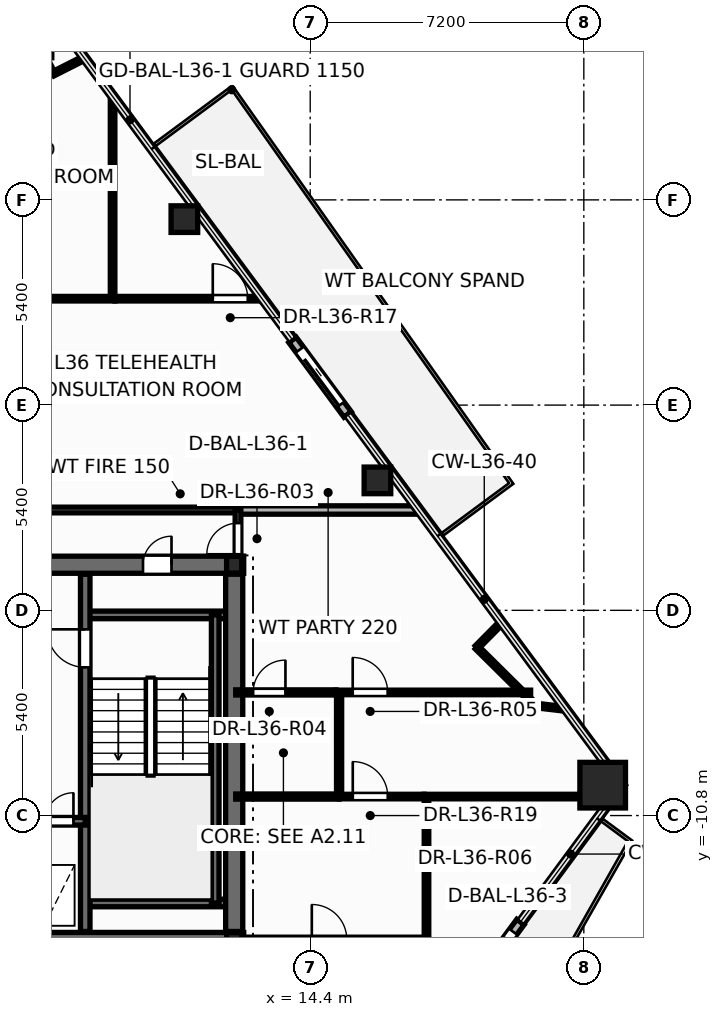
"""IFC4 building model, lengths in metres.
Left out: names, types, materials, properties, quantities, classifications, styles, units other than length and angle.
Written with IfcOpenShell. Run it as: python <this file> out.ifc"""

import sys

from ifc_helpers import new_model, si_unit, direction, frame, frame_2d, origin, origin_2d, place, context, subcontext, project, spatial, rectangle, hollow_rectangle, hollow_circle, i_section, extrude, element, fill, save


model = new_model("IFC4")
c1 = context("Model", 3, precision=1e-05, world=origin(), true_north=direction((0.0, 1.0)))
c2 = subcontext(c1, "Body", "Model", "MODEL_VIEW")
j1 = project(units=[si_unit("LENGTHUNIT", "METRE"), si_unit("PLANEANGLEUNIT", "RADIAN")], contexts=[c1])
p1 = place(None, origin())
s1 = spatial("IfcSite", under=j1, at=p1, CompositionType="ELEMENT")
p2 = place(p1, origin())
s2 = spatial("IfcBuilding", under=s1, at=p2, CompositionType="ELEMENT")
p3 = place(p2, frame((0.0, 0.0, 140.1)))
s3 = spatial("IfcBuildingStorey", under=s2, at=p3, CompositionType="ELEMENT", Elevation=140.1)
p4 = place(p3, frame((22.096, -10.0, 0.0), z_axis=(0.0, 0.0, 1.0), x_axis=(1.0, 0.0, 0.0)))
e1 = element("IfcColumn", 1, at=p4, inside=s3, PredefinedType="COLUMN", context=c2, shape_type="SweptSolid", body=[
    extrude(hollow_rectangle(XDim=1.2, YDim=1.2, WallThickness=0.055, at=origin_2d()), origin(), (0.0, 0.0, 1.0), 3.6),
])
for number, where, z_axis, x_axis in (
    (2, (16.169, -1.98, 0.0), (0.0, 0.0, 1.0), (1.0, 0.0, 0.0)),
    (3, (11.089, 4.894, 0.0), (0.0, 0.0, 1.0), (1.0, 0.0, 0.0)),
):
    element("IfcColumn", number, at=place(p3, frame(where, z_axis=z_axis, x_axis=x_axis)), inside=s3, PredefinedType="COLUMN", context=c2, shape_type="SweptSolid", body=[
        extrude(hollow_circle(Radius=0.35, WallThickness=0.03, at=origin_2d()), origin(), (0.0, 0.0, 1.0), 3.6),
    ])
for number, where, z_axis, x_axis in (
    (4, (12.4, -14.1, 0.0), (0.0, 0.0, 1.0), (1.0, 0.0, 0.0)),
    (5, (12.4, -4.2, 0.0), (0.0, 0.0, 1.0), (1.0, 0.0, 0.0)),
):
    element("IfcColumn", number, at=place(p3, frame(where, z_axis=z_axis, x_axis=x_axis)), inside=s3, PredefinedType="COLUMN", context=c2, shape_type="SweptSolid", body=[
        extrude(i_section(OverallWidth=0.4, OverallDepth=0.44, WebThickness=0.028, FlangeThickness=0.04, at=origin_2d()), origin(), (0.0, 0.0, 1.0), 3.6),
    ])
p5 = place(p3, frame((15.384, -0.246, -0.015), z_axis=(0.0, 0.0, 1.0), x_axis=(-0.594317914364, 0.804230201289, 0.0)))
e6 = element("IfcWall", 6, at=p5, inside=s3, PredefinedType="STANDARD", context=c2, shape_type="SweptSolid", body=[
    extrude(rectangle(XDim=2.44, YDim=0.24, at=frame_2d((1.22, 0.0))), origin(), (0.0, 0.0, 1.0), 2.807),
])
p6 = place(p5, frame((0.32, 0.0, 0.015)))
e7 = element("IfcOpeningElement", 7, at=p6, cuts=e6, PredefinedType="OPENING", context=c2, shape_type="SweptSolid", body=[
    extrude(rectangle(XDim=1.806, YDim=2.204, at=frame_2d((0.9, 1.102))), frame((0.0, 0.13, 0.0), z_axis=(0.0, -1.0, 0.0), x_axis=(1.0, 0.0, 0.0)), (0.0, 0.0, 1.0), 0.26),
])
p7 = place(p3, frame((18.66, -15.323, -0.015), z_axis=(0.0, 0.0, 1.0), x_axis=(0.594381437757, 0.804183254271, 0.0)))
e8 = element("IfcWall", 8, at=p7, inside=s3, PredefinedType="STANDARD", context=c2, shape_type="SweptSolid", body=[
    extrude(rectangle(XDim=2.14, YDim=0.24, at=frame_2d((1.07, 0.0))), origin(), (0.0, 0.0, 1.0), 2.807),
])
p8 = place(p7, frame((0.32, 0.0, 0.015)))
e9 = element("IfcOpeningElement", 9, at=p8, cuts=e8, PredefinedType="OPENING", context=c2, shape_type="SweptSolid", body=[
    extrude(rectangle(XDim=1.506, YDim=2.204, at=frame_2d((0.75, 1.102))), frame((0.0, 0.13, 0.0), z_axis=(0.0, -1.0, 0.0), x_axis=(1.0, 0.0, 0.0)), (0.0, 0.0, 1.0), 0.26),
])
p9 = place(p3, frame((-12.65, -14.1, 0.0), z_axis=(0.0, 0.0, 1.0), x_axis=(1.0, 0.0, 0.0)))
e10 = element("IfcWall", 10, at=p9, inside=s3, PredefinedType="SHEAR", context=c2, shape_type="SweptSolid", body=[
    extrude(rectangle(XDim=25.3, YDim=0.45, at=frame_2d((12.65, 0.0))), origin(), (0.0, 0.0, 1.0), 3.6),
])
p10 = place(p3, frame((-12.65, -4.2, 0.0), z_axis=(0.0, 0.0, 1.0), x_axis=(1.0, 0.0, 0.0)))
e11 = element("IfcWall", 11, at=p10, inside=s3, PredefinedType="SHEAR", context=c2, shape_type="SweptSolid", body=[
    extrude(rectangle(XDim=25.3, YDim=0.45, at=frame_2d((12.65, 0.0))), origin(), (0.0, 0.0, 1.0), 3.6),
])
p11 = place(p10, frame((1.85, 0.0, 0.0)))
e12 = element("IfcOpeningElement", 12, at=p11, cuts=e11, PredefinedType="OPENING", context=c2, shape_type="SweptSolid", body=[
    extrude(rectangle(XDim=0.756, YDim=2.054, at=frame_2d((0.375, 1.027))), frame((0.0, 0.235, 0.0), z_axis=(0.0, -1.0, 0.0), x_axis=(1.0, 0.0, 0.0)), (0.0, 0.0, 1.0), 0.47),
])
p12 = place(p10, frame((22.65, 0.0, 0.0)))
e13 = element("IfcOpeningElement", 13, at=p12, cuts=e11, PredefinedType="OPENING", context=c2, shape_type="SweptSolid", body=[
    extrude(rectangle(XDim=0.756, YDim=2.054, at=frame_2d((0.375, 1.027))), frame((0.0, 0.235, 0.0), z_axis=(0.0, -1.0, 0.0), x_axis=(1.0, 0.0, 0.0)), (0.0, 0.0, 1.0), 0.47),
])
p13 = place(p10, frame((5.85, 0.0, 0.0)))
e14 = element("IfcOpeningElement", 14, at=p13, cuts=e11, PredefinedType="OPENING", context=c2, shape_type="SweptSolid", body=[
    extrude(rectangle(XDim=1.006, YDim=2.104, at=frame_2d((0.5, 1.052))), frame((0.0, 0.235, 0.0), z_axis=(0.0, -1.0, 0.0), x_axis=(1.0, 0.0, 0.0)), (0.0, 0.0, 1.0), 0.47),
])
p14 = place(p10, frame((10.35, 0.0, 0.0)))
e15 = element("IfcOpeningElement", 15, at=p14, cuts=e11, PredefinedType="OPENING", context=c2, shape_type="SweptSolid", body=[
    extrude(rectangle(XDim=1.406, YDim=2.154, at=frame_2d((0.7, 1.077))), frame((0.0, 0.235, 0.0), z_axis=(0.0, -1.0, 0.0), x_axis=(1.0, 0.0, 0.0)), (0.0, 0.0, 1.0), 0.47),
])
p15 = place(p10, frame((18.45, 0.0, 0.0)))
e16 = element("IfcOpeningElement", 16, at=p15, cuts=e11, PredefinedType="OPENING", context=c2, shape_type="SweptSolid", body=[
    extrude(rectangle(XDim=1.006, YDim=2.104, at=frame_2d((0.5, 1.052))), frame((0.0, 0.235, 0.0), z_axis=(0.0, -1.0, 0.0), x_axis=(1.0, 0.0, 0.0)), (0.0, 0.0, 1.0), 0.47),
])
for number, where, z_axis, x_axis in (
    (17, (8.48, -5.52, 0.0), (0.0, 0.0, 1.0), (1.0, 0.0, 0.0)),
    (18, (8.48, -13.1, 0.0), (0.0, 0.0, 1.0), (1.0, 0.0, 0.0)),
):
    element("IfcWall", number, at=place(p3, frame(where, z_axis=z_axis, x_axis=x_axis)), inside=s3, PredefinedType="SOLIDWALL", context=c2, shape_type="SweptSolid", body=[
        extrude(rectangle(XDim=3.87, YDim=0.2, at=frame_2d((1.935, 0.0))), origin(), (0.0, 0.0, 1.0), 3.6),
    ])
p16 = place(p3, frame((11.9, -13.1, 0.0), z_axis=(0.0, 0.0, 1.0), x_axis=(0.0, 1.0, 0.0)))
e19 = element("IfcWall", 19, at=p16, inside=s3, PredefinedType="SOLIDWALL", context=c2, shape_type="SweptSolid", body=[
    extrude(rectangle(XDim=7.58, YDim=0.2, at=frame_2d((3.79, 0.0))), origin(), (0.0, 0.0, 1.0), 3.6),
])
p17 = place(p3, frame((8.48, -13.85, 0.0), z_axis=(0.0, 0.0, 1.0), x_axis=(0.0, 1.0, 0.0)))
e20 = element("IfcWall", 20, at=p17, inside=s3, PredefinedType="SHEAR", context=c2, shape_type="SweptSolid", body=[
    extrude(rectangle(XDim=9.4, YDim=0.25, at=frame_2d((4.7, 0.0))), origin(), (0.0, 0.0, 1.0), 3.6),
])
p18 = place(p17, frame((6.95, 0.0, 0.0)))
e21 = element("IfcOpeningElement", 21, at=p18, cuts=e20, PredefinedType="OPENING", context=c2, shape_type="SweptSolid", body=[
    extrude(rectangle(XDim=1.006, YDim=2.104, at=frame_2d((0.5, 1.052))), frame((0.0, 0.135, 0.0), z_axis=(0.0, -1.0, 0.0), x_axis=(1.0, 0.0, 0.0)), (0.0, 0.0, 1.0), 0.27),
])
p19 = place(p3, frame((5.12, -10.95, 0.0), z_axis=(0.0, 0.0, 1.0), x_axis=(1.0, 0.0, 0.0)))
e22 = element("IfcWall", 22, at=p19, inside=s3, PredefinedType="SOLIDWALL", context=c2, shape_type="SweptSolid", body=[
    extrude(rectangle(XDim=3.36, YDim=0.2, at=frame_2d((1.68, 0.0))), origin(), (0.0, 0.0, 1.0), 3.6),
])
p20 = place(p19, frame((0.42, 0.0, 0.0)))
e23 = element("IfcOpeningElement", 23, at=p20, cuts=e22, PredefinedType="OPENING", context=c2, shape_type="SweptSolid", body=[
    extrude(rectangle(XDim=1.106, YDim=2.104, at=frame_2d((0.55, 1.052))), frame((0.0, 0.11, 0.0), z_axis=(0.0, -1.0, 0.0), x_axis=(1.0, 0.0, 0.0)), (0.0, 0.0, 1.0), 0.22),
])
p21 = place(p19, frame((2.3, 0.0, 0.0)))
e24 = element("IfcOpeningElement", 24, at=p21, cuts=e22, PredefinedType="OPENING", context=c2, shape_type="SweptSolid", body=[
    extrude(rectangle(XDim=0.756, YDim=2.054, at=frame_2d((0.375, 1.027))), frame((0.0, 0.11, 0.0), z_axis=(0.0, -1.0, 0.0), x_axis=(1.0, 0.0, 0.0)), (0.0, 0.0, 1.0), 0.22),
])
p22 = place(p3, frame((12.4, -13.85, 0.0), z_axis=(0.0, 0.0, 1.0), x_axis=(0.0, 1.0, 0.0)))
e25 = element("IfcWall", 25, at=p22, inside=s3, PredefinedType="SHEAR", context=c2, shape_type="SweptSolid", body=[
    extrude(rectangle(XDim=9.4, YDim=0.45, at=frame_2d((4.7, 0.0))), origin(), (0.0, 0.0, 1.0), 3.6),
])
p23 = place(p3, frame((2.36, -2.76, 0.0), z_axis=(0.0, 0.0, 1.0), x_axis=(1.0, 0.0, 0.0)))
e26 = element("IfcWall", 26, at=p23, inside=s3, PredefinedType="PARTITIONING", context=c2, shape_type="SweptSolid", body=[
    extrude(rectangle(XDim=10.14, YDim=0.15, at=frame_2d((5.07, 0.0))), origin(), (0.0, 0.0, 1.0), 2.325),
])
p24 = place(p23, frame((0.36, 0.0, 0.0)))
e27 = element("IfcOpeningElement", 27, at=p24, cuts=e26, PredefinedType="OPENING", context=c2, shape_type="SweptSolid", body=[
    extrude(rectangle(XDim=0.956, YDim=2.104, at=frame_2d((0.475, 1.052))), frame((0.0, 0.085, 0.0), z_axis=(0.0, -1.0, 0.0), x_axis=(1.0, 0.0, 0.0)), (0.0, 0.0, 1.0), 0.17),
])
p25 = place(p3, frame((2.36, 2.8, 0.0), z_axis=(0.0, 0.0, 1.0), x_axis=(1.0, 0.0, 0.0)))
e28 = element("IfcWall", 28, at=p25, inside=s3, PredefinedType="PARTITIONING", context=c2, shape_type="SweptSolid", body=[
    extrude(rectangle(XDim=6.9, YDim=0.12, at=frame_2d((3.45, 0.0))), origin(), (0.0, 0.0, 1.0), 2.325),
])
p26 = place(p3, frame((9.2, 2.8, 0.0), z_axis=(0.0, 0.0, 1.0), x_axis=(0.0, 1.0, 0.0)))
e29 = element("IfcWall", 29, at=p26, inside=s3, PredefinedType="PARTITIONING", context=c2, shape_type="SweptSolid", body=[
    extrude(rectangle(XDim=5.322, YDim=0.12, at=frame_2d((2.661, 0.0))), origin(), (0.0, 0.0, 1.0), 2.325),
])
p27 = place(p3, frame((2.36, 9.2, 0.0), z_axis=(0.0, 0.0, 1.0), x_axis=(1.0, 0.0, 0.0)))
e30 = element("IfcWall", 30, at=p27, inside=s3, PredefinedType="PARTITIONING", context=c2, shape_type="SweptSolid", body=[
    extrude(rectangle(XDim=5.24, YDim=0.12, at=frame_2d((2.62, 0.0))), origin(), (0.0, 0.0, 1.0), 2.325),
])
p28 = place(p3, frame((15.08, -7.56, 0.0), z_axis=(0.0, 0.0, 1.0), x_axis=(1.0, 0.0, 0.0)))
e31 = element("IfcWall", 31, at=p28, inside=s3, PredefinedType="PARTITIONING", context=c2, shape_type="SweptSolid", body=[
    extrude(rectangle(XDim=5.12, YDim=0.12, at=frame_2d((2.56, 0.0))), origin(), (0.0, 0.0, 1.0), 2.325),
])
p29 = place(p28, frame((0.438, 0.0, 0.0)))
e32 = element("IfcOpeningElement", 32, at=p29, cuts=e31, PredefinedType="OPENING", context=c2, shape_type="SweptSolid", body=[
    extrude(rectangle(XDim=0.926, YDim=2.104, at=frame_2d((0.46, 1.052))), frame((0.0, 0.07, 0.0), z_axis=(0.0, -1.0, 0.0), x_axis=(1.0, 0.0, 0.0)), (0.0, 0.0, 1.0), 0.14),
])
p30 = place(p3, frame((17.4, -10.3, 0.0), z_axis=(0.0, 0.0, 1.0), x_axis=(1.0, 0.0, 0.0)))
e33 = element("IfcWall", 33, at=p30, inside=s3, PredefinedType="PARTITIONING", context=c2, shape_type="SweptSolid", body=[
    extrude(rectangle(XDim=4.972, YDim=0.12, at=frame_2d((2.486, 0.0))), origin(), (0.0, 0.0, 1.0), 2.792),
])
p31 = place(p3, frame((12.5, -2.76, 0.0), z_axis=(0.0, 0.0, 1.0), x_axis=(1.0, 0.0, 0.0)))
e34 = element("IfcWall", 34, at=p31, inside=s3, PredefinedType="PARTITIONING", context=c2, shape_type="SweptSolid", body=[
    extrude(rectangle(XDim=4.743, YDim=0.22, at=frame_2d((2.371, 0.0))), origin(), (0.0, 0.0, 1.0), 2.792),
])
p32 = place(p3, frame((9.262, 2.8, 0.0), z_axis=(0.0, 0.0, 1.0), x_axis=(1.0, 0.0, 0.0)))
e35 = element("IfcWall", 35, at=p32, inside=s3, PredefinedType="PARTITIONING", context=c2, shape_type="SweptSolid", body=[
    extrude(rectangle(XDim=3.872, YDim=0.12, at=frame_2d((1.936, 0.0))), origin(), (0.0, 0.0, 1.0), 2.792),
])
p33 = place(p32, frame((2.574, 0.0, 0.0)))
e36 = element("IfcOpeningElement", 36, at=p33, cuts=e35, PredefinedType="OPENING", context=c2, shape_type="SweptSolid", body=[
    extrude(rectangle(XDim=0.926, YDim=2.104, at=frame_2d((0.46, 1.052))), frame((0.0, 0.07, 0.0), z_axis=(0.0, -1.0, 0.0), x_axis=(1.0, 0.0, 0.0)), (0.0, 0.0, 1.0), 0.14),
])
p34 = place(p3, frame((17.46, -14.06, 0.0), z_axis=(0.0, 0.0, 1.0), x_axis=(0.0, 1.0, 0.0)))
e37 = element("IfcWall", 37, at=p34, inside=s3, PredefinedType="PARTITIONING", context=c2, shape_type="SweptSolid", body=[
    extrude(rectangle(XDim=3.76, YDim=0.12, at=frame_2d((1.88, 0.0))), origin(), (0.0, 0.0, 1.0), 3.35),
])
p35 = place(p3, frame((12.44, -7.56, 0.0), z_axis=(0.0, 0.0, 1.0), x_axis=(1.0, 0.0, 0.0)))
e38 = element("IfcWall", 38, at=p35, inside=s3, PredefinedType="PARTITIONING", context=c2, shape_type="SweptSolid", body=[
    extrude(rectangle(XDim=2.638, YDim=0.135, at=frame_2d((1.319, 0.0))), origin(), (0.0, 0.0, 1.0), 2.792),
])
p36 = place(p35, frame((0.458, 0.0, 0.0)))
e39 = element("IfcOpeningElement", 39, at=p36, cuts=e38, PredefinedType="OPENING", context=c2, shape_type="SweptSolid", body=[
    extrude(rectangle(XDim=0.856, YDim=2.104, at=frame_2d((0.425, 1.052))), frame((0.0, 0.078, 0.0), z_axis=(0.0, -1.0, 0.0), x_axis=(1.0, 0.0, 0.0)), (0.0, 0.0, 1.0), 0.155),
])
p37 = place(p3, frame((15.16, -10.3, 0.0), z_axis=(0.0, 0.0, 1.0), x_axis=(0.0, 1.0, 0.0)))
e40 = element("IfcWall", 40, at=p37, inside=s3, PredefinedType="PARTITIONING", context=c2, shape_type="SweptSolid", body=[
    extrude(rectangle(XDim=2.74, YDim=0.135, at=frame_2d((1.37, 0.0))), origin(), (0.0, 0.0, 1.0), 3.35),
])
p38 = place(p3, frame((12.44, -10.3, 0.0), z_axis=(0.0, 0.0, 1.0), x_axis=(1.0, 0.0, 0.0)))
e41 = element("IfcWall", 41, at=p38, inside=s3, PredefinedType="PARTITIONING", context=c2, shape_type="SweptSolid", body=[
    extrude(rectangle(XDim=2.72, YDim=0.135, at=frame_2d((1.36, 0.0))), origin(), (0.0, 0.0, 1.0), 2.792),
])
p39 = place(p3, frame((15.16, -10.3, 0.0), z_axis=(0.0, 0.0, 1.0), x_axis=(1.0, 0.0, 0.0)))
e42 = element("IfcWall", 42, at=p39, inside=s3, PredefinedType="PARTITIONING", context=c2, shape_type="SweptSolid", body=[
    extrude(rectangle(XDim=2.238, YDim=0.12, at=frame_2d((1.119, 0.0))), origin(), (0.0, 0.0, 1.0), 3.35),
])
p40 = place(p39, frame((0.36, 0.0, 0.0)))
e43 = element("IfcOpeningElement", 43, at=p40, cuts=e42, PredefinedType="OPENING", context=c2, shape_type="SweptSolid", body=[
    extrude(rectangle(XDim=0.926, YDim=2.104, at=frame_2d((0.46, 1.052))), frame((0.0, 0.07, 0.0), z_axis=(0.0, -1.0, 0.0), x_axis=(1.0, 0.0, 0.0)), (0.0, 0.0, 1.0), 0.14),
])
p41 = place(p3, frame((7.632, 8.716, 0.0), z_axis=(0.0, 0.0, 1.0), x_axis=(-0.451617656026, 0.892211573992, 0.0)))
e44 = element("IfcWall", 44, at=p41, inside=s3, PredefinedType="PARTITIONING", context=c2, shape_type="SweptSolid", body=[
    extrude(rectangle(XDim=2.06, YDim=0.12, at=frame_2d((1.03, 0.0))), origin(), (0.0, 0.0, 1.0), 3.35),
])
p42 = place(p3, frame((20.33, -7.903, 0.0), z_axis=(0.0, 0.0, 1.0), x_axis=(-0.71069096923, 0.70350433279, 0.0)))
e45 = element("IfcWall", 45, at=p42, inside=s3, PredefinedType="PARTITIONING", context=c2, shape_type="SweptSolid", body=[
    extrude(rectangle(XDim=2.174, YDim=0.12, at=frame_2d((1.087, 0.0))), origin(), (0.0, 0.0, 1.0), 3.35),
])
p43 = place(p3, frame((12.5, -4.24, 0.0), z_axis=(0.0, 0.0, 1.0), x_axis=(0.0, 1.0, 0.0)))
e46 = element("IfcWall", 46, at=p43, inside=s3, PredefinedType="PARTITIONING", context=c2, shape_type="SweptSolid", body=[
    extrude(rectangle(XDim=1.48, YDim=0.15, at=frame_2d((0.74, 0.0))), origin(), (0.0, 0.0, 1.0), 2.325),
])
p44 = place(p43, frame((0.315, 0.0, 0.0)))
e47 = element("IfcOpeningElement", 47, at=p44, cuts=e46, PredefinedType="OPENING", context=c2, shape_type="SweptSolid", body=[
    extrude(rectangle(XDim=0.826, YDim=2.104, at=frame_2d((0.41, 1.052))), frame((0.0, 0.085, 0.0), z_axis=(0.0, -1.0, 0.0), x_axis=(1.0, 0.0, 0.0)), (0.0, 0.0, 1.0), 0.17),
])
p45 = place(p3, frame((8.445, 9.127, 0.0), z_axis=(0.0, 0.0, 1.0), x_axis=(-0.892273316606, -0.451495657202, 0.0)))
e48 = element("IfcWall", 48, at=p45, inside=s3, PredefinedType="PARTITIONING", context=c2, shape_type="SweptSolid", body=[
    extrude(rectangle(XDim=0.911, YDim=0.12, at=frame_2d((0.456, 0.0))), origin(), (0.0, 0.0, 1.0), 2.792),
])
p46 = place(p3, frame((18.784, -6.374, 0.0), z_axis=(0.0, 0.0, 1.0), x_axis=(0.703469957503, 0.710724995262, 0.0)))
e49 = element("IfcWall", 49, at=p46, inside=s3, PredefinedType="PARTITIONING", context=c2, shape_type="SweptSolid", body=[
    extrude(rectangle(XDim=0.909, YDim=0.12, at=frame_2d((0.454, 0.0))), origin(), (0.0, 0.0, 1.0), 2.792),
])
p47 = place(p3, frame((21.098, -7.993, 0.0), z_axis=(0.0, 0.0, 1.0), x_axis=(-0.993159218392, 0.116768004705, 0.0)))
e50 = element("IfcWall", 50, at=p47, inside=s3, PredefinedType="PARTITIONING", context=c2, shape_type="SweptSolid", body=[
    extrude(rectangle(XDim=0.774, YDim=0.12, at=frame_2d((0.387, 0.0))), origin(), (0.0, 0.0, 1.0), 2.792),
])
p48 = place(p6, origin())
e51 = element("IfcDoor", 51, at=p48, inside=s3, OperationType="SLIDING_TO_LEFT", PredefinedType="DOOR", context=c2, shape_type="SweptSolid", body=[
    extrude(rectangle(XDim=1.8, YDim=2.2, at=frame_2d((0.9, 1.1))), frame((0.0, 0.025, 0.0), z_axis=(0.0, -1.0, 0.0), x_axis=(1.0, 0.0, 0.0)), (0.0, 0.0, 1.0), 0.05),
])
fill(e7, e51)
p49 = place(p8, origin())
e52 = element("IfcDoor", 52, at=p49, inside=s3, OperationType="SLIDING_TO_RIGHT", PredefinedType="DOOR", context=c2, shape_type="SweptSolid", body=[
    extrude(rectangle(XDim=1.5, YDim=2.2, at=frame_2d((0.75, 1.1))), frame((0.0, 0.025, 0.0), z_axis=(0.0, -1.0, 0.0), x_axis=(1.0, 0.0, 0.0)), (0.0, 0.0, 1.0), 0.05),
])
fill(e9, e52)
p50 = place(p18, origin())
e53 = element("IfcDoor", 53, at=p50, inside=s3, OperationType="SINGLE_SWING_RIGHT", PredefinedType="DOOR", context=c2, shape_type="SweptSolid", body=[
    extrude(rectangle(XDim=1.0, YDim=2.1, at=frame_2d((0.5, 1.05))), frame((0.0, 0.025, 0.0), z_axis=(0.0, -1.0, 0.0), x_axis=(1.0, 0.0, 0.0)), (0.0, 0.0, 1.0), 0.05),
])
fill(e21, e53)
p51 = place(p21, origin())
e54 = element("IfcDoor", 54, at=p51, inside=s3, OperationType="SINGLE_SWING_RIGHT", PredefinedType="DOOR", context=c2, shape_type="SweptSolid", body=[
    extrude(rectangle(XDim=0.75, YDim=2.05, at=frame_2d((0.375, 1.025))), frame((0.0, 0.025, 0.0), z_axis=(0.0, -1.0, 0.0), x_axis=(1.0, 0.0, 0.0)), (0.0, 0.0, 1.0), 0.05),
])
fill(e24, e54)
p52 = place(p12, origin())
e55 = element("IfcDoor", 55, at=p52, inside=s3, OperationType="SINGLE_SWING_RIGHT", PredefinedType="DOOR", context=c2, shape_type="SweptSolid", body=[
    extrude(rectangle(XDim=0.75, YDim=2.05, at=frame_2d((0.375, 1.025))), frame((0.0, 0.025, 0.0), z_axis=(0.0, -1.0, 0.0), x_axis=(1.0, 0.0, 0.0)), (0.0, 0.0, 1.0), 0.05),
])
fill(e13, e55)
p53 = place(p44, origin())
e56 = element("IfcDoor", 56, at=p53, inside=s3, OperationType="SINGLE_SWING_LEFT", PredefinedType="DOOR", context=c2, shape_type="SweptSolid", body=[
    extrude(rectangle(XDim=0.82, YDim=2.1, at=frame_2d((0.41, 1.05))), frame((0.0, 0.025, 0.0), z_axis=(0.0, -1.0, 0.0), x_axis=(1.0, 0.0, 0.0)), (0.0, 0.0, 1.0), 0.05),
])
fill(e47, e56)
p54 = place(p36, origin())
e57 = element("IfcDoor", 57, at=p54, inside=s3, OperationType="SINGLE_SWING_RIGHT", PredefinedType="DOOR", context=c2, shape_type="SweptSolid", body=[
    extrude(rectangle(XDim=0.85, YDim=2.1, at=frame_2d((0.425, 1.05))), frame((0.0, 0.025, 0.0), z_axis=(0.0, -1.0, 0.0), x_axis=(1.0, 0.0, 0.0)), (0.0, 0.0, 1.0), 0.05),
])
fill(e39, e57)
p55 = place(p29, origin())
e58 = element("IfcDoor", 58, at=p55, inside=s3, OperationType="SINGLE_SWING_LEFT", PredefinedType="DOOR", context=c2, shape_type="SweptSolid", body=[
    extrude(rectangle(XDim=0.92, YDim=2.1, at=frame_2d((0.46, 1.05))), frame((0.0, 0.025, 0.0), z_axis=(0.0, -1.0, 0.0), x_axis=(1.0, 0.0, 0.0)), (0.0, 0.0, 1.0), 0.05),
])
fill(e32, e58)
p56 = place(p33, origin())
e59 = element("IfcDoor", 59, at=p56, inside=s3, OperationType="SINGLE_SWING_LEFT", PredefinedType="DOOR", context=c2, shape_type="SweptSolid", body=[
    extrude(rectangle(XDim=0.92, YDim=2.1, at=frame_2d((0.46, 1.05))), frame((0.0, 0.025, 0.0), z_axis=(0.0, -1.0, 0.0), x_axis=(1.0, 0.0, 0.0)), (0.0, 0.0, 1.0), 0.05),
])
fill(e36, e59)
p57 = place(p40, origin())
e60 = element("IfcDoor", 60, at=p57, inside=s3, OperationType="SINGLE_SWING_LEFT", PredefinedType="DOOR", context=c2, shape_type="SweptSolid", body=[
    extrude(rectangle(XDim=0.92, YDim=2.1, at=frame_2d((0.46, 1.05))), frame((0.0, 0.025, 0.0), z_axis=(0.0, -1.0, 0.0), x_axis=(1.0, 0.0, 0.0)), (0.0, 0.0, 1.0), 0.05),
])
fill(e43, e60)
save(model, sys.argv[1])
